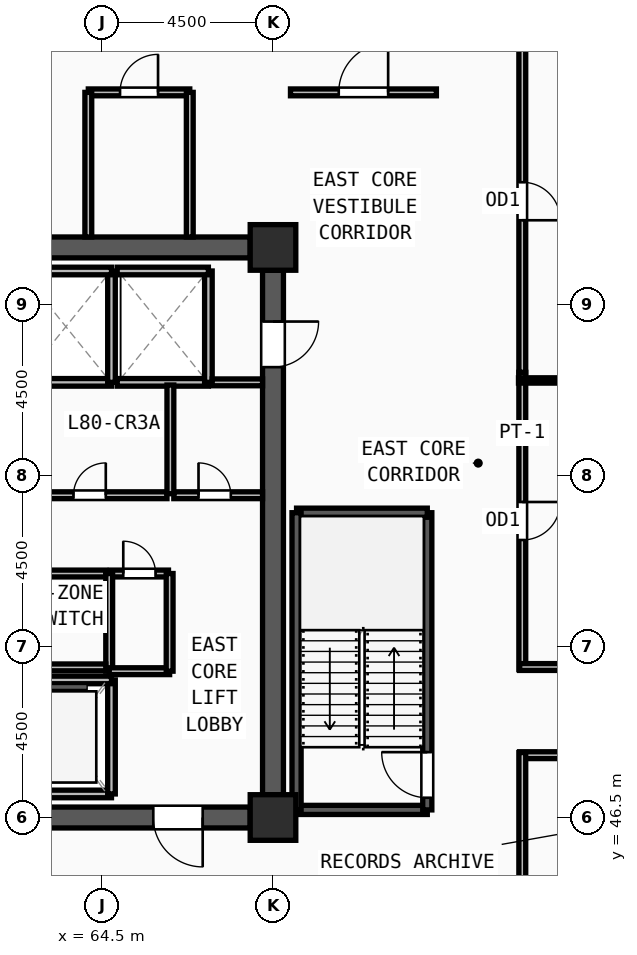
"""IFC4 building model, lengths in metres.
Left out: names, types, materials, properties, quantities, classifications, styles, units other than length and angle.
Written with IfcOpenShell. Run it as: python <this file> out.ifc"""

import sys

from ifc_helpers import new_model, si_unit, direction, frame, frame_2d, origin, origin_2d, place, context, subcontext, project, spatial, rectangle, extrude, source, transform, mapped, element, fill, save


model = new_model("IFC4")
c1 = context("Model", 3, precision=1e-05, world=origin(), true_north=direction((0.0, 1.0)))
c2 = subcontext(c1, "Body", "Model", "MODEL_VIEW")
j1 = project(units=[si_unit("LENGTHUNIT", "METRE"), si_unit("PLANEANGLEUNIT", "RADIAN")], contexts=[c1])
p1 = place(None, origin())
s1 = spatial("IfcSite", under=j1, at=p1, CompositionType="ELEMENT")
p2 = place(p1, origin())
s2 = spatial("IfcBuilding", under=s1, at=p2, CompositionType="ELEMENT")
p3 = place(p2, frame((0.0, 0.0, 309.0)))
s3 = spatial("IfcBuildingStorey", under=s2, at=p3, CompositionType="ELEMENT", Elevation=309.0)
m1 = source(origin(), c2, "Body", "SweptSolid", [
    extrude(rectangle(XDim=1.2, YDim=1.2, at=origin_2d()), origin(), (0.0, 0.0, 1.0), 3.75),
])
for number, where, z_axis, x_axis in (
    (1, (69.0, 46.5, 0.0), (0.0, 0.0, 1.0), (1.0, 0.0, 0.0)),
    (2, (69.0, 61.5, 0.0), (0.0, 0.0, 1.0), (1.0, 0.0, 0.0)),
):
    element("IfcColumn", number, at=place(p3, frame(where, z_axis=z_axis, x_axis=x_axis)), inside=s3, PredefinedType="COLUMN", context=c2, shape_type="MappedRepresentation", body=[
        mapped(m1, transform((0.0, 0.0, 0.0), x_axis=(1.0, 0.0, 0.0), y_axis=(0.0, 1.0, 0.0), z_axis=(0.0, 0.0, 1.0), scale=1.0)),
    ])
p4 = place(p3, frame((60.6, 61.5, 0.0), z_axis=(0.0, 0.0, 1.0), x_axis=(1.0, 0.0, 0.0)))
e3 = element("IfcWall", 3, at=p4, inside=s3, PredefinedType="SHEAR", context=c2, shape_type="SweptSolid", body=[
    extrude(rectangle(XDim=7.8, YDim=0.55, at=frame_2d((3.9, 0.0))), origin(), (0.0, 0.0, 1.0), 3.57),
])
p5 = place(p3, frame((69.0, 60.9, 0.0), z_axis=(0.0, 0.0, 1.0), x_axis=(0.0, -1.0, 0.0)))
e4 = element("IfcWall", 4, at=p5, inside=s3, PredefinedType="SHEAR", context=c2, shape_type="SweptSolid", body=[
    extrude(rectangle(XDim=13.8, YDim=0.55, at=frame_2d((6.9, 0.0))), origin(), (0.0, 0.0, 1.0), 3.57),
])
m2 = source(origin(), c2, "Body", "SweptSolid", [
    extrude(rectangle(XDim=1.2, YDim=2.2, at=frame_2d((0.6, 1.1))), frame((0.0, 0.285, 0.0), z_axis=(0.0, -1.0, 0.0), x_axis=(1.0, 0.0, 0.0)), (0.0, 0.0, 1.0), 0.57),
])
p6 = place(p5, frame((1.35, 0.0, 0.0)))
e5 = element("IfcOpeningElement", 5, at=p6, cuts=e4, PredefinedType="OPENING", context=c2, shape_type="MappedRepresentation", body=[
    mapped(m2, transform((0.0, 0.0, 0.0), x_axis=(1.0, 0.0, 0.0), y_axis=(0.0, 1.0, 0.0), z_axis=(0.0, 0.0, 1.0), scale=1.0)),
])
p7 = place(p3, frame((68.4, 46.5, 0.0), z_axis=(0.0, 0.0, 1.0), x_axis=(-1.0, 0.0, 0.0)))
e6 = element("IfcWall", 6, at=p7, inside=s3, PredefinedType="SHEAR", context=c2, shape_type="SweptSolid", body=[
    extrude(rectangle(XDim=7.8, YDim=0.55, at=frame_2d((3.9, 0.0))), origin(), (0.0, 0.0, 1.0), 3.57),
])
m3 = source(origin(), c2, "Body", "SweptSolid", [
    extrude(rectangle(XDim=1.3, YDim=2.2, at=frame_2d((0.65, 1.1))), frame((0.0, 0.285, 0.0), z_axis=(0.0, -1.0, 0.0), x_axis=(1.0, 0.0, 0.0)), (0.0, 0.0, 1.0), 0.57),
])
p8 = place(p7, frame((1.25, 0.0, 0.0)))
e7 = element("IfcOpeningElement", 7, at=p8, cuts=e6, PredefinedType="OPENING", context=c2, shape_type="MappedRepresentation", body=[
    mapped(m3, transform((0.0, 0.0, 0.0), x_axis=(1.0, 0.0, 0.0), y_axis=(0.0, 1.0, 0.0), z_axis=(0.0, 0.0, 1.0), scale=1.0)),
])
p9 = place(p3, frame((69.62, 46.7, 0.0), z_axis=(0.0, 0.0, 1.0), x_axis=(1.0, 0.0, 0.0)))
e8 = element("IfcWall", 8, at=p9, inside=s3, PredefinedType="SOLIDWALL", context=c2, shape_type="SweptSolid", body=[
    extrude(rectangle(XDim=3.44, YDim=0.24, at=frame_2d((1.72, 0.0))), origin(), (0.0, 0.0, 1.0), 3.57),
])
p10 = place(p3, frame((73.06, 46.7, 0.0), z_axis=(0.0, 0.0, 1.0), x_axis=(0.0, 1.0, 0.0)))
e9 = element("IfcWall", 9, at=p10, inside=s3, PredefinedType="SOLIDWALL", context=c2, shape_type="SweptSolid", body=[
    extrude(rectangle(XDim=7.82, YDim=0.24, at=frame_2d((3.91, 0.0))), origin(), (0.0, 0.0, 1.0), 3.57),
])
m4 = source(origin(), c2, "Body", "SweptSolid", [
    extrude(rectangle(XDim=1.2, YDim=2.2, at=frame_2d((0.6, 1.1))), frame((0.0, 0.13, 0.0), z_axis=(0.0, -1.0, 0.0), x_axis=(1.0, 0.0, 0.0)), (0.0, 0.0, 1.0), 0.26),
])
p11 = place(p10, frame((0.32, 0.0, 0.0)))
e10 = element("IfcOpeningElement", 10, at=p11, cuts=e9, PredefinedType="OPENING", context=c2, shape_type="MappedRepresentation", body=[
    mapped(m4, transform((0.0, 0.0, 0.0), x_axis=(1.0, 0.0, 0.0), y_axis=(0.0, 1.0, 0.0), z_axis=(0.0, 0.0, 1.0), scale=1.0)),
])
p12 = place(p3, frame((73.06, 54.52, 0.0), z_axis=(0.0, 0.0, 1.0), x_axis=(-1.0, 0.0, 0.0)))
e11 = element("IfcWall", 11, at=p12, inside=s3, PredefinedType="SOLIDWALL", context=c2, shape_type="SweptSolid", body=[
    extrude(rectangle(XDim=3.44, YDim=0.24, at=frame_2d((1.72, 0.0))), origin(), (0.0, 0.0, 1.0), 3.57),
])
p13 = place(p3, frame((69.62, 54.52, 0.0), z_axis=(0.0, 0.0, 1.0), x_axis=(0.0, -1.0, 0.0)))
e12 = element("IfcWall", 12, at=p13, inside=s3, PredefinedType="SOLIDWALL", context=c2, shape_type="SweptSolid", body=[
    extrude(rectangle(XDim=7.82, YDim=0.24, at=frame_2d((3.91, 0.0))), origin(), (0.0, 0.0, 1.0), 3.57),
])
p14 = place(p3, frame((62.35, 47.12, 0.0), z_axis=(0.0, 0.0, 1.0), x_axis=(1.0, 0.0, 0.0)))
e13 = element("IfcWall", 13, at=p14, inside=s3, PredefinedType="SOLIDWALL", context=c2, shape_type="SweptSolid", body=[
    extrude(rectangle(XDim=2.4, YDim=0.2, at=frame_2d((1.2, 0.0))), origin(), (0.0, 0.0, 1.0), 3.57),
])
p15 = place(p3, frame((64.75, 47.12, 0.0), z_axis=(0.0, 0.0, 1.0), x_axis=(0.0, 1.0, 0.0)))
e14 = element("IfcWall", 14, at=p15, inside=s3, PredefinedType="SOLIDWALL", context=c2, shape_type="SweptSolid", body=[
    extrude(rectangle(XDim=3.0, YDim=0.2, at=frame_2d((1.5, 0.0))), origin(), (0.0, 0.0, 1.0), 3.57),
])
for number, where, z_axis, x_axis in (
    (15, (64.75, 50.12, 0.0), (0.0, 0.0, 1.0), (-1.0, 0.0, 0.0)),
    (16, (62.35, 57.95, 0.0), (0.0, 0.0, 1.0), (1.0, 0.0, 0.0)),
):
    element("IfcWall", number, at=place(p3, frame(where, z_axis=z_axis, x_axis=x_axis)), inside=s3, PredefinedType="SOLIDWALL", context=c2, shape_type="SweptSolid", body=[
        extrude(rectangle(XDim=2.4, YDim=0.2, at=frame_2d((1.2, 0.0))), origin(), (0.0, 0.0, 1.0), 3.57),
    ])
p16 = place(p3, frame((64.75, 57.95, 0.0), z_axis=(0.0, 0.0, 1.0), x_axis=(0.0, 1.0, 0.0)))
e17 = element("IfcWall", 17, at=p16, inside=s3, PredefinedType="SOLIDWALL", context=c2, shape_type="SweptSolid", body=[
    extrude(rectangle(XDim=2.93, YDim=0.2, at=frame_2d((1.465, 0.0))), origin(), (0.0, 0.0, 1.0), 3.57),
])
p17 = place(p3, frame((64.75, 60.88, 0.0), z_axis=(0.0, 0.0, 1.0), x_axis=(-1.0, 0.0, 0.0)))
e18 = element("IfcWall", 18, at=p17, inside=s3, PredefinedType="SOLIDWALL", context=c2, shape_type="SweptSolid", body=[
    extrude(rectangle(XDim=2.4, YDim=0.2, at=frame_2d((1.2, 0.0))), origin(), (0.0, 0.0, 1.0), 3.57),
])
p18 = place(p3, frame((64.9, 57.95, 0.0), z_axis=(0.0, 0.0, 1.0), x_axis=(1.0, 0.0, 0.0)))
e19 = element("IfcWall", 19, at=p18, inside=s3, PredefinedType="SOLIDWALL", context=c2, shape_type="SweptSolid", body=[
    extrude(rectangle(XDim=2.4, YDim=0.2, at=frame_2d((1.2, 0.0))), origin(), (0.0, 0.0, 1.0), 3.57),
])
p19 = place(p3, frame((67.3, 57.95, 0.0), z_axis=(0.0, 0.0, 1.0), x_axis=(0.0, 1.0, 0.0)))
e20 = element("IfcWall", 20, at=p19, inside=s3, PredefinedType="SOLIDWALL", context=c2, shape_type="SweptSolid", body=[
    extrude(rectangle(XDim=2.93, YDim=0.2, at=frame_2d((1.465, 0.0))), origin(), (0.0, 0.0, 1.0), 3.57),
])
p20 = place(p3, frame((67.3, 60.88, 0.0), z_axis=(0.0, 0.0, 1.0), x_axis=(-1.0, 0.0, 0.0)))
e21 = element("IfcWall", 21, at=p20, inside=s3, PredefinedType="SOLIDWALL", context=c2, shape_type="SweptSolid", body=[
    extrude(rectangle(XDim=2.4, YDim=0.2, at=frame_2d((1.2, 0.0))), origin(), (0.0, 0.0, 1.0), 3.57),
])
p21 = place(p3, frame((60.0, 52.92, 0.0), z_axis=(0.0, 0.0, 1.0), x_axis=(1.0, 0.0, 0.0)))
e22 = element("IfcWall", 22, at=p21, inside=s3, PredefinedType="PARTITIONING", context=c2, shape_type="SweptSolid", body=[
    extrude(rectangle(XDim=4.6, YDim=0.18, at=frame_2d((2.3, 0.0))), origin(), (0.0, 0.0, 1.0), 3.57),
])
m5 = source(origin(), c2, "Body", "SweptSolid", [
    extrude(rectangle(XDim=0.85, YDim=2.1, at=frame_2d((0.425, 1.05))), frame((0.0, 0.1, 0.0), z_axis=(0.0, -1.0, 0.0), x_axis=(1.0, 0.0, 0.0)), (0.0, 0.0, 1.0), 0.2),
])
p22 = place(p21, frame((1.975, 0.0, 0.0)))
e23 = element("IfcOpeningElement", 23, at=p22, cuts=e22, PredefinedType="OPENING", context=c2, shape_type="MappedRepresentation", body=[
    mapped(m5, transform((0.0, 0.0, 0.0), x_axis=(1.0, 0.0, 0.0), y_axis=(0.0, 1.0, 0.0), z_axis=(0.0, 0.0, 1.0), scale=1.0)),
])
p23 = place(p3, frame((62.1, 54.98, 0.0), z_axis=(0.0, 0.0, 1.0), x_axis=(1.0, 0.0, 0.0)))
e24 = element("IfcWall", 24, at=p23, inside=s3, PredefinedType="PARTITIONING", context=c2, shape_type="SweptSolid", body=[
    extrude(rectangle(XDim=4.11, YDim=0.18, at=frame_2d((2.055, 0.0))), origin(), (0.0, 0.0, 1.0), 3.57),
])
p24 = place(p23, frame((1.65, 0.0, 0.0)))
e25 = element("IfcOpeningElement", 25, at=p24, cuts=e24, PredefinedType="OPENING", context=c2, shape_type="MappedRepresentation", body=[
    mapped(m5, transform((0.0, 0.0, 0.0), x_axis=(1.0, 0.0, 0.0), y_axis=(0.0, 1.0, 0.0), z_axis=(0.0, 0.0, 1.0), scale=1.0)),
])
p25 = place(p3, frame((66.39, 54.98, 0.0), z_axis=(0.0, 0.0, 1.0), x_axis=(1.0, 0.0, 0.0)))
e26 = element("IfcWall", 26, at=p25, inside=s3, PredefinedType="PARTITIONING", context=c2, shape_type="SweptSolid", body=[
    extrude(rectangle(XDim=2.335, YDim=0.18, at=frame_2d((1.167, 0.0))), origin(), (0.0, 0.0, 1.0), 3.57),
])
p26 = place(p25, frame((0.65, 0.0, 0.0)))
e27 = element("IfcOpeningElement", 27, at=p26, cuts=e26, PredefinedType="OPENING", context=c2, shape_type="MappedRepresentation", body=[
    mapped(m5, transform((0.0, 0.0, 0.0), x_axis=(1.0, 0.0, 0.0), y_axis=(0.0, 1.0, 0.0), z_axis=(0.0, 0.0, 1.0), scale=1.0)),
])
p27 = place(p3, frame((64.72, 52.92, 0.0), z_axis=(0.0, 0.0, 1.0), x_axis=(1.0, 0.0, 0.0)))
e28 = element("IfcWall", 28, at=p27, inside=s3, PredefinedType="PARTITIONING", context=c2, shape_type="SweptSolid", body=[
    extrude(rectangle(XDim=1.53, YDim=0.18, at=frame_2d((0.765, 0.0))), origin(), (0.0, 0.0, 1.0), 3.57),
])
p28 = place(p27, frame((0.34, 0.0, 0.0)))
e29 = element("IfcOpeningElement", 29, at=p28, cuts=e28, PredefinedType="OPENING", context=c2, shape_type="MappedRepresentation", body=[
    mapped(m5, transform((0.0, 0.0, 0.0), x_axis=(1.0, 0.0, 0.0), y_axis=(0.0, 1.0, 0.0), z_axis=(0.0, 0.0, 1.0), scale=1.0)),
])
p29 = place(p3, frame((64.14, 65.58, 0.0), z_axis=(0.0, 0.0, 1.0), x_axis=(1.0, 0.0, 0.0)))
e30 = element("IfcWall", 30, at=p29, inside=s3, PredefinedType="PARTITIONING", context=c2, shape_type="SweptSolid", body=[
    extrude(rectangle(XDim=2.67, YDim=0.18, at=frame_2d((1.335, 0.0))), origin(), (0.0, 0.0, 1.0), 3.57),
])
m6 = source(origin(), c2, "Body", "SweptSolid", [
    extrude(rectangle(XDim=1.0, YDim=2.2, at=frame_2d((0.5, 1.1))), frame((0.0, 0.1, 0.0), z_axis=(0.0, -1.0, 0.0), x_axis=(1.0, 0.0, 0.0)), (0.0, 0.0, 1.0), 0.2),
])
p30 = place(p29, frame((0.835, 0.0, 0.0)))
e31 = element("IfcOpeningElement", 31, at=p30, cuts=e30, PredefinedType="OPENING", context=c2, shape_type="MappedRepresentation", body=[
    mapped(m6, transform((0.0, 0.0, 0.0), x_axis=(1.0, 0.0, 0.0), y_axis=(0.0, 1.0, 0.0), z_axis=(0.0, 0.0, 1.0), scale=1.0)),
])
p31 = place(p3, frame((69.46, 65.58, 0.0), z_axis=(0.0, 0.0, 1.0), x_axis=(1.0, 0.0, 0.0)))
e32 = element("IfcWall", 32, at=p31, inside=s3, PredefinedType="PARTITIONING", context=c2, shape_type="SweptSolid", body=[
    extrude(rectangle(XDim=3.84, YDim=0.18, at=frame_2d((1.92, 0.0))), origin(), (0.0, 0.0, 1.0), 3.57),
])
m7 = source(origin(), c2, "Body", "SweptSolid", [
    extrude(rectangle(XDim=1.3, YDim=2.2, at=frame_2d((0.65, 1.1))), frame((0.0, 0.1, 0.0), z_axis=(0.0, -1.0, 0.0), x_axis=(1.0, 0.0, 0.0)), (0.0, 0.0, 1.0), 0.2),
])
p32 = place(p31, frame((1.27, 0.0, 0.0)))
e33 = element("IfcOpeningElement", 33, at=p32, cuts=e32, PredefinedType="OPENING", context=c2, shape_type="MappedRepresentation", body=[
    mapped(m7, transform((0.0, 0.0, 0.0), x_axis=(1.0, 0.0, 0.0), y_axis=(0.0, 1.0, 0.0), z_axis=(0.0, 0.0, 1.0), scale=1.0)),
])
p33 = place(p3, frame((75.56, 58.215, 0.0), z_axis=(0.0, 0.0, 1.0), x_axis=(0.0, -1.0, 0.0)))
e34 = element("IfcWall", 34, at=p33, inside=s3, PredefinedType="PARTITIONING", context=c2, shape_type="SweptSolid", body=[
    extrude(rectangle(XDim=7.825, YDim=0.18, at=frame_2d((3.913, 0.0))), origin(), (0.0, 0.0, 1.0), 3.57),
])
p34 = place(p33, frame((3.413, 0.0, 0.0)))
e35 = element("IfcOpeningElement", 35, at=p34, cuts=e34, PredefinedType="OPENING", context=c2, shape_type="MappedRepresentation", body=[
    mapped(m6, transform((0.0, 0.0, 0.0), x_axis=(1.0, 0.0, 0.0), y_axis=(0.0, 1.0, 0.0), z_axis=(0.0, 0.0, 1.0), scale=1.0)),
])
p35 = place(p3, frame((75.56, 67.215, 0.0), z_axis=(0.0, 0.0, 1.0), x_axis=(0.0, -1.0, 0.0)))
e36 = element("IfcWall", 36, at=p35, inside=s3, PredefinedType="PARTITIONING", context=c2, shape_type="SweptSolid", body=[
    extrude(rectangle(XDim=9.0, YDim=0.18, at=frame_2d((4.5, 0.0))), origin(), (0.0, 0.0, 1.0), 3.57),
])
p36 = place(p35, frame((4.0, 0.0, 0.0)))
e37 = element("IfcOpeningElement", 37, at=p36, cuts=e36, PredefinedType="OPENING", context=c2, shape_type="MappedRepresentation", body=[
    mapped(m6, transform((0.0, 0.0, 0.0), x_axis=(1.0, 0.0, 0.0), y_axis=(0.0, 1.0, 0.0), z_axis=(0.0, 0.0, 1.0), scale=1.0)),
])
p37 = place(p3, frame((81.947, 48.14, 0.0), z_axis=(0.0, 0.0, 1.0), x_axis=(-1.0, 0.0, 0.0)))
e38 = element("IfcWall", 38, at=p37, inside=s3, PredefinedType="PARTITIONING", context=c2, shape_type="SweptSolid", body=[
    extrude(rectangle(XDim=6.457, YDim=0.18, at=frame_2d((3.229, 0.0))), origin(), (0.0, 0.0, 1.0), 3.57),
])
p38 = place(p37, frame((2.729, 0.0, 0.0)))
e39 = element("IfcOpeningElement", 39, at=p38, cuts=e38, PredefinedType="OPENING", context=c2, shape_type="MappedRepresentation", body=[
    mapped(m6, transform((0.0, 0.0, 0.0), x_axis=(1.0, 0.0, 0.0), y_axis=(0.0, 1.0, 0.0), z_axis=(0.0, 0.0, 1.0), scale=1.0)),
])
p39 = place(p3, frame((66.3, 55.02, 0.0), z_axis=(0.0, 0.0, 1.0), x_axis=(0.0, 1.0, 0.0)))
e40 = element("IfcWall", 40, at=p39, inside=s3, PredefinedType="PARTITIONING", context=c2, shape_type="SweptSolid", body=[
    extrude(rectangle(XDim=2.86, YDim=0.18, at=frame_2d((1.43, 0.0))), origin(), (0.0, 0.0, 1.0), 3.57),
])
p40 = place(p3, frame((64.69, 50.35, 0.0), z_axis=(0.0, 0.0, 1.0), x_axis=(0.0, 1.0, 0.0)))
e41 = element("IfcWall", 41, at=p40, inside=s3, PredefinedType="PARTITIONING", context=c2, shape_type="SweptSolid", body=[
    extrude(rectangle(XDim=2.57, YDim=0.18, at=frame_2d((1.285, 0.0))), origin(), (0.0, 0.0, 1.0), 3.57),
])
p41 = place(p3, frame((64.69, 50.35, 0.0), z_axis=(0.0, 0.0, 1.0), x_axis=(1.0, 0.0, 0.0)))
e42 = element("IfcWall", 42, at=p41, inside=s3, PredefinedType="PARTITIONING", context=c2, shape_type="SweptSolid", body=[
    extrude(rectangle(XDim=1.59, YDim=0.18, at=frame_2d((0.795, 0.0))), origin(), (0.0, 0.0, 1.0), 3.57),
])
p42 = place(p3, frame((66.28, 50.35, 0.0), z_axis=(0.0, 0.0, 1.0), x_axis=(0.0, 1.0, 0.0)))
e43 = element("IfcWall", 43, at=p42, inside=s3, PredefinedType="PARTITIONING", context=c2, shape_type="SweptSolid", body=[
    extrude(rectangle(XDim=2.57, YDim=0.18, at=frame_2d((1.285, 0.0))), origin(), (0.0, 0.0, 1.0), 3.57),
])
for number, where, z_axis, x_axis in (
    (44, (64.14, 61.775, 0.0), (0.0, 0.0, 1.0), (0.0, 1.0, 0.0)),
    (45, (66.81, 61.775, 0.0), (0.0, 0.0, 1.0), (0.0, 1.0, 0.0)),
):
    element("IfcWall", number, at=place(p3, frame(where, z_axis=z_axis, x_axis=x_axis)), inside=s3, PredefinedType="PARTITIONING", context=c2, shape_type="SweptSolid", body=[
        extrude(rectangle(XDim=3.805, YDim=0.18, at=frame_2d((1.903, 0.0))), origin(), (0.0, 0.0, 1.0), 3.57),
    ])
p43 = place(p3, frame((75.49, 50.46, 0.0), z_axis=(0.0, 0.0, 1.0), x_axis=(1.0, 0.0, 0.0)))
e46 = element("IfcWall", 46, at=p43, inside=s3, PredefinedType="PARTITIONING", context=c2, shape_type="SweptSolid", body=[
    extrude(rectangle(XDim=7.595, YDim=0.18, at=frame_2d((3.797, 0.0))), origin(), (0.0, 0.0, 1.0), 3.57),
])
p44 = place(p3, frame((75.56, 48.21, 0.0), z_axis=(0.0, 0.0, 1.0), x_axis=(0.0, -1.0, 0.0)))
e47 = element("IfcWall", 47, at=p44, inside=s3, PredefinedType="PARTITIONING", context=c2, shape_type="SweptSolid", body=[
    extrude(rectangle(XDim=3.395, YDim=0.18, at=frame_2d((1.698, 0.0))), origin(), (0.0, 0.0, 1.0), 3.57),
])
p45 = place(p3, frame((75.46, 58.0, 0.0), z_axis=(0.0, 0.0, 1.0), x_axis=(1.0, 0.0, 0.0)))
e48 = element("IfcWall", 48, at=p45, inside=s3, PredefinedType="PARTITIONING", context=c2, shape_type="SweptSolid", body=[
    extrude(rectangle(XDim=11.434, YDim=0.14, at=frame_2d((5.717, 0.0))), origin(), (0.0, 0.0, 1.0), 3.57),
])
p46 = place(p3, frame((60.0, 50.45, 0.0), z_axis=(0.0, 0.0, 1.0), x_axis=(1.0, 0.0, 0.0)))
e49 = element("IfcWall", 49, at=p46, inside=s3, PredefinedType="PARTITIONING", context=c2, shape_type="SweptSolid", body=[
    extrude(rectangle(XDim=4.6, YDim=0.18, at=frame_2d((2.3, 0.0))), origin(), (0.0, 0.0, 1.0), 3.57),
])
p47 = place(p3, frame((67.4, 57.95, 0.0), z_axis=(0.0, 0.0, 1.0), x_axis=(1.0, 0.0, 0.0)))
e50 = element("IfcWall", 50, at=p47, inside=s3, PredefinedType="PARTITIONING", context=c2, shape_type="SweptSolid", body=[
    extrude(rectangle(XDim=1.325, YDim=0.18, at=frame_2d((0.663, 0.0))), origin(), (0.0, 0.0, 1.0), 3.57),
])
m8 = source(origin(), c2, "Body", "SweptSolid", [
    extrude(rectangle(XDim=1.3, YDim=2.2, at=frame_2d((0.65, 1.1))), frame((0.0, 0.025, 0.0), z_axis=(0.0, -1.0, 0.0), x_axis=(1.0, 0.0, 0.0)), (0.0, 0.0, 1.0), 0.05),
])
p48 = place(p8, origin())
e51 = element("IfcDoor", 51, at=p48, inside=s3, OperationType="SINGLE_SWING_LEFT", PredefinedType="DOOR", context=c2, shape_type="MappedRepresentation", body=[
    mapped(m8, transform((0.0, 0.0, 0.0), x_axis=(1.0, 0.0, 0.0), y_axis=(0.0, 1.0, 0.0), z_axis=(0.0, 0.0, 1.0), scale=1.0)),
])
fill(e7, e51)
m9 = source(origin(), c2, "Body", "SweptSolid", [
    extrude(rectangle(XDim=1.2, YDim=2.2, at=frame_2d((0.6, 1.1))), frame((0.0, 0.025, 0.0), z_axis=(0.0, -1.0, 0.0), x_axis=(1.0, 0.0, 0.0)), (0.0, 0.0, 1.0), 0.05),
])
p49 = place(p6, origin())
e52 = element("IfcDoor", 52, at=p49, inside=s3, OperationType="SINGLE_SWING_LEFT", PredefinedType="DOOR", context=c2, shape_type="MappedRepresentation", body=[
    mapped(m9, transform((0.0, 0.0, 0.0), x_axis=(1.0, 0.0, 0.0), y_axis=(0.0, 1.0, 0.0), z_axis=(0.0, 0.0, 1.0), scale=1.0)),
])
fill(e5, e52)
p50 = place(p11, origin())
e53 = element("IfcDoor", 53, at=p50, inside=s3, OperationType="SINGLE_SWING_RIGHT", PredefinedType="DOOR", context=c2, shape_type="MappedRepresentation", body=[
    mapped(m9, transform((0.0, 0.0, 0.0), x_axis=(1.0, 0.0, 0.0), y_axis=(0.0, 1.0, 0.0), z_axis=(0.0, 0.0, 1.0), scale=1.0)),
])
fill(e10, e53)
m10 = source(origin(), c2, "Body", "SweptSolid", [
    extrude(rectangle(XDim=0.85, YDim=2.1, at=frame_2d((0.425, 1.05))), frame((0.0, 0.025, 0.0), z_axis=(0.0, -1.0, 0.0), x_axis=(1.0, 0.0, 0.0)), (0.0, 0.0, 1.0), 0.05),
])
p51 = place(p24, origin())
e54 = element("IfcDoor", 54, at=p51, inside=s3, OperationType="SINGLE_SWING_RIGHT", PredefinedType="DOOR", context=c2, shape_type="MappedRepresentation", body=[
    mapped(m10, transform((0.0, 0.0, 0.0), x_axis=(1.0, 0.0, 0.0), y_axis=(0.0, 1.0, 0.0), z_axis=(0.0, 0.0, 1.0), scale=1.0)),
])
fill(e25, e54)
p52 = place(p26, origin())
e55 = element("IfcDoor", 55, at=p52, inside=s3, OperationType="SINGLE_SWING_LEFT", PredefinedType="DOOR", context=c2, shape_type="MappedRepresentation", body=[
    mapped(m10, transform((0.0, 0.0, 0.0), x_axis=(1.0, 0.0, 0.0), y_axis=(0.0, 1.0, 0.0), z_axis=(0.0, 0.0, 1.0), scale=1.0)),
])
fill(e27, e55)
p53 = place(p28, origin())
e56 = element("IfcDoor", 56, at=p53, inside=s3, OperationType="SINGLE_SWING_LEFT", PredefinedType="DOOR", context=c2, shape_type="MappedRepresentation", body=[
    mapped(m10, transform((0.0, 0.0, 0.0), x_axis=(1.0, 0.0, 0.0), y_axis=(0.0, 1.0, 0.0), z_axis=(0.0, 0.0, 1.0), scale=1.0)),
])
fill(e29, e56)
m11 = source(origin(), c2, "Body", "SweptSolid", [
    extrude(rectangle(XDim=1.0, YDim=2.2, at=frame_2d((0.5, 1.1))), frame((0.0, 0.025, 0.0), z_axis=(0.0, -1.0, 0.0), x_axis=(1.0, 0.0, 0.0)), (0.0, 0.0, 1.0), 0.05),
])
p54 = place(p30, origin())
e57 = element("IfcDoor", 57, at=p54, inside=s3, OperationType="SINGLE_SWING_RIGHT", PredefinedType="DOOR", context=c2, shape_type="MappedRepresentation", body=[
    mapped(m11, transform((0.0, 0.0, 0.0), x_axis=(1.0, 0.0, 0.0), y_axis=(0.0, 1.0, 0.0), z_axis=(0.0, 0.0, 1.0), scale=1.0)),
])
fill(e31, e57)
p55 = place(p32, origin())
e58 = element("IfcDoor", 58, at=p55, inside=s3, OperationType="SINGLE_SWING_RIGHT", PredefinedType="DOOR", context=c2, shape_type="MappedRepresentation", body=[
    mapped(m8, transform((0.0, 0.0, 0.0), x_axis=(1.0, 0.0, 0.0), y_axis=(0.0, 1.0, 0.0), z_axis=(0.0, 0.0, 1.0), scale=1.0)),
])
fill(e33, e58)
p56 = place(p34, origin())
e59 = element("IfcDoor", 59, at=p56, inside=s3, OperationType="SINGLE_SWING_LEFT", PredefinedType="DOOR", context=c2, shape_type="MappedRepresentation", body=[
    mapped(m11, transform((0.0, 0.0, 0.0), x_axis=(1.0, 0.0, 0.0), y_axis=(0.0, 1.0, 0.0), z_axis=(0.0, 0.0, 1.0), scale=1.0)),
])
fill(e35, e59)
p57 = place(p36, origin())
e60 = element("IfcDoor", 60, at=p57, inside=s3, OperationType="SINGLE_SWING_RIGHT", PredefinedType="DOOR", context=c2, shape_type="MappedRepresentation", body=[
    mapped(m11, transform((0.0, 0.0, 0.0), x_axis=(1.0, 0.0, 0.0), y_axis=(0.0, 1.0, 0.0), z_axis=(0.0, 0.0, 1.0), scale=1.0)),
])
fill(e37, e60)
save(model, sys.argv[1])
